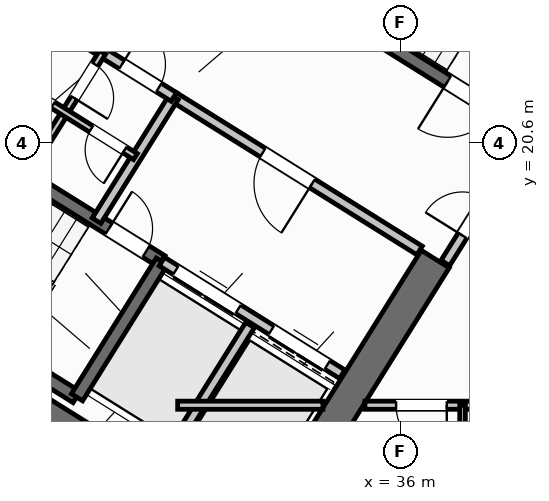
"""IFC4 building model, lengths in metres.
Left out: names, types, materials, properties, quantities, classifications, styles, units other than length and angle.
Written with IfcOpenShell. Run it as: python <this file> out.ifc"""

import sys

from ifc_helpers import new_model, si_unit, direction, frame, frame_2d, origin, place, context, subcontext, project, spatial, rectangle, extrude, source, transform, mapped, element, fill, save


model = new_model("IFC4")
c1 = context("Model", 3, precision=1e-05, world=origin(), true_north=direction((0.0, 1.0)))
c2 = subcontext(c1, "Body", "Model", "MODEL_VIEW")
j1 = project(units=[si_unit("LENGTHUNIT", "METRE"), si_unit("PLANEANGLEUNIT", "RADIAN")], contexts=[c1])
p1 = place(None, origin())
s1 = spatial("IfcSite", under=j1, at=p1, CompositionType="ELEMENT")
p2 = place(p1, origin())
s2 = spatial("IfcBuilding", under=s1, at=p2, CompositionType="ELEMENT")
p3 = place(p2, frame((0.0, 0.0, 45.6)))
s3 = spatial("IfcBuildingStorey", under=s2, at=p3, CompositionType="ELEMENT", Elevation=45.6)
p4 = place(p3, frame((33.409, 12.45, 0.0), z_axis=(0.0, 0.0, 1.0), x_axis=(-0.848051132073, 0.529914405721, 0.0)))
e1 = element("IfcWall", 1, at=p4, inside=s3, PredefinedType="SHEAR", context=c2, shape_type="SweptSolid", body=[
    extrude(rectangle(XDim=13.24, YDim=0.65, at=frame_2d((6.62, 0.0))), origin(), (0.0, 0.0, 1.0), 3.35),
])
p5 = place(p3, frame((36.683, 18.304, 0.0), z_axis=(0.0, 0.0, 1.0), x_axis=(-0.529899109053, -0.848060690178, 0.0)))
e2 = element("IfcWall", 2, at=p5, inside=s3, PredefinedType="SHEAR", context=c2, shape_type="SweptSolid", body=[
    extrude(rectangle(XDim=6.375, YDim=0.65, at=frame_2d((3.188, 0.0))), origin(), (0.0, 0.0, 1.0), 3.35),
])
p6 = place(p3, frame((29.268, 6.429, 0.0), z_axis=(0.0, 0.0, 1.0), x_axis=(-0.848049971435, 0.529916263149, 0.0)))
e3 = element("IfcWall", 3, at=p6, inside=s3, PredefinedType="STANDARD", context=c2, shape_type="SweptSolid", body=[
    extrude(rectangle(XDim=31.588, YDim=0.32, at=frame_2d((15.794, 0.0))), origin(), (0.0, 0.0, 1.0), 3.35),
])
p7 = place(p6, frame((16.362, 0.0, 0.0)))
e4 = element("IfcOpeningElement", 4, at=p7, cuts=e3, PredefinedType="OPENING", context=c2, shape_type="SweptSolid", body=[
    extrude(rectangle(XDim=1.2, YDim=2.15, at=frame_2d((0.6, 1.075))), frame((0.0, 0.17, 0.0), z_axis=(0.0, -1.0, 0.0), x_axis=(1.0, 0.0, 0.0)), (0.0, 0.0, 1.0), 0.34),
])
p8 = place(p6, frame((2.989, 0.0, 0.8)))
e5 = element("IfcOpeningElement", 5, at=p8, cuts=e3, PredefinedType="OPENING", context=c2, shape_type="SweptSolid", body=[
    extrude(rectangle(XDim=2.1, YDim=1.55, at=frame_2d((1.05, 0.775))), frame((0.0, 0.17, 0.0), z_axis=(0.0, -1.0, 0.0), x_axis=(1.0, 0.0, 0.0)), (0.0, 0.0, 1.0), 0.34),
])
p9 = place(p6, frame((8.359, 0.0, 0.8)))
e6 = element("IfcOpeningElement", 6, at=p9, cuts=e3, PredefinedType="OPENING", context=c2, shape_type="SweptSolid", body=[
    extrude(rectangle(XDim=2.1, YDim=1.55, at=frame_2d((1.05, 0.775))), frame((0.0, 0.17, 0.0), z_axis=(0.0, -1.0, 0.0), x_axis=(1.0, 0.0, 0.0)), (0.0, 0.0, 1.0), 0.34),
])
p10 = place(p6, frame((13.284, 0.0, 0.95)))
e7 = element("IfcOpeningElement", 7, at=p10, cuts=e3, PredefinedType="OPENING", context=c2, shape_type="SweptSolid", body=[
    extrude(rectangle(XDim=1.2, YDim=1.4, at=frame_2d((0.6, 0.7))), frame((0.0, 0.17, 0.0), z_axis=(0.0, -1.0, 0.0), x_axis=(1.0, 0.0, 0.0)), (0.0, 0.0, 1.0), 0.34),
])
p11 = place(p6, frame((20.259, 0.0, 0.95)))
e8 = element("IfcOpeningElement", 8, at=p11, cuts=e3, PredefinedType="OPENING", context=c2, shape_type="SweptSolid", body=[
    extrude(rectangle(XDim=1.2, YDim=1.4, at=frame_2d((0.6, 0.7))), frame((0.0, 0.17, 0.0), z_axis=(0.0, -1.0, 0.0), x_axis=(1.0, 0.0, 0.0)), (0.0, 0.0, 1.0), 0.34),
])
p12 = place(p6, frame((22.929, 0.0, 0.95)))
e9 = element("IfcOpeningElement", 9, at=p12, cuts=e3, PredefinedType="OPENING", context=c2, shape_type="SweptSolid", body=[
    extrude(rectangle(XDim=1.2, YDim=1.4, at=frame_2d((0.6, 0.7))), frame((0.0, 0.17, 0.0), z_axis=(0.0, -1.0, 0.0), x_axis=(1.0, 0.0, 0.0)), (0.0, 0.0, 1.0), 0.34),
])
p13 = place(p6, frame((26.106, 0.0, 0.85)))
e10 = element("IfcOpeningElement", 10, at=p13, cuts=e3, PredefinedType="OPENING", context=c2, shape_type="SweptSolid", body=[
    extrude(rectangle(XDim=1.5, YDim=1.5, at=frame_2d((0.75, 0.75))), frame((0.0, 0.17, 0.0), z_axis=(0.0, -1.0, 0.0), x_axis=(1.0, 0.0, 0.0)), (0.0, 0.0, 1.0), 0.34),
])
p14 = place(p6, frame((29.068, 0.0, 0.85)))
e11 = element("IfcOpeningElement", 11, at=p14, cuts=e3, PredefinedType="OPENING", context=c2, shape_type="SweptSolid", body=[
    extrude(rectangle(XDim=1.8, YDim=1.5, at=frame_2d((0.9, 0.75))), frame((0.0, 0.17, 0.0), z_axis=(0.0, -1.0, 0.0), x_axis=(1.0, 0.0, 0.0)), (0.0, 0.0, 1.0), 0.34),
])
p15 = place(p3, frame((29.605, 15.581, 0.0), z_axis=(0.0, 0.0, 1.0), x_axis=(-0.848036911448, 0.529937163087, 0.0)))
e12 = element("IfcWall", 12, at=p15, inside=s3, PredefinedType="SHEAR", context=c2, shape_type="SweptSolid", body=[
    extrude(rectangle(XDim=7.46, YDim=0.26, at=frame_2d((3.73, 0.0))), origin(), (0.0, 0.0, 1.0), 3.35),
])
p16 = place(p3, frame((31.28, 18.261, 0.0), z_axis=(0.0, 0.0, 1.0), x_axis=(-0.848051618787, 0.529913626805, 0.0)))
e13 = element("IfcWall", 13, at=p16, inside=s3, PredefinedType="SHEAR", context=c2, shape_type="SweptSolid", body=[
    extrude(rectangle(XDim=7.46, YDim=0.26, at=frame_2d((3.73, 0.0))), origin(), (0.0, 0.0, 1.0), 3.35),
])
p17 = place(p16, frame((0.36, 0.0, 0.0)))
e14 = element("IfcOpeningElement", 14, at=p17, cuts=e13, PredefinedType="OPENING", context=c2, shape_type="SweptSolid", body=[
    extrude(rectangle(XDim=0.86, YDim=2.05, at=frame_2d((0.43, 1.025))), frame((0.0, 0.14, 0.0), z_axis=(0.0, -1.0, 0.0), x_axis=(1.0, 0.0, 0.0)), (0.0, 0.0, 1.0), 0.28),
])
p18 = place(p3, frame((31.288, 18.256, 0.0), z_axis=(0.0, 0.0, 1.0), x_axis=(-0.529943379326, -0.848033026897, 0.0)))
e15 = element("IfcWall", 15, at=p18, inside=s3, PredefinedType="SHEAR", context=c2, shape_type="SweptSolid", body=[
    extrude(rectangle(XDim=3.16, YDim=0.26, at=frame_2d((1.58, 0.0))), origin(), (0.0, 0.0, 1.0), 3.35),
])
p19 = place(p3, frame((38.046, 21.108, 0.0), z_axis=(0.0, 0.0, 1.0), x_axis=(-0.848054434086, 0.529909121291, 0.0)))
e16 = element("IfcWall", 16, at=p19, inside=s3, PredefinedType="SHEAR", context=c2, shape_type="SweptSolid", body=[
    extrude(rectangle(XDim=7.33, YDim=0.26, at=frame_2d((3.665, 0.0))), origin(), (0.0, 0.0, 1.0), 3.35),
])
p20 = place(p19, frame((0.22, 0.0, 0.0)))
e17 = element("IfcOpeningElement", 17, at=p20, cuts=e16, PredefinedType="OPENING", context=c2, shape_type="SweptSolid", body=[
    extrude(rectangle(XDim=1.1, YDim=2.1, at=frame_2d((0.55, 1.05))), frame((0.0, 0.14, 0.0), z_axis=(0.0, -1.0, 0.0), x_axis=(1.0, 0.0, 0.0)), (0.0, 0.0, 1.0), 0.28),
])
p21 = place(p3, frame((34.848, 16.031, 0.0), z_axis=(0.0, 0.0, 1.0), x_axis=(-0.848044042236, 0.529925751807, 0.0)))
e18 = element("IfcWall", 18, at=p21, inside=s3, PredefinedType="STANDARD", context=c2, shape_type="SweptSolid", body=[
    extrude(rectangle(XDim=4.198, YDim=0.2, at=frame_2d((2.099, 0.0))), origin(), (0.0, 0.0, 1.0), 3.34),
])
p22 = place(p21, frame((0.348, 0.0, 0.0)))
e19 = element("IfcOpeningElement", 19, at=p22, cuts=e18, PredefinedType="OPENING", context=c2, shape_type="SweptSolid", body=[
    extrude(rectangle(XDim=1.3, YDim=2.2, at=frame_2d((0.65, 1.1))), frame((0.0, 0.11, 0.0), z_axis=(0.0, -1.0, 0.0), x_axis=(1.0, 0.0, 0.0)), (0.0, 0.0, 1.0), 0.22),
])
p23 = place(p21, frame((2.423, 0.0, 0.0)))
e20 = element("IfcOpeningElement", 20, at=p23, cuts=e18, PredefinedType="OPENING", context=c2, shape_type="SweptSolid", body=[
    extrude(rectangle(XDim=1.45, YDim=2.25, at=frame_2d((0.725, 1.125))), frame((0.0, 0.11, 0.0), z_axis=(0.0, -1.0, 0.0), x_axis=(1.0, 0.0, 0.0)), (0.0, 0.0, 1.0), 0.22),
])
p24 = place(p3, frame((36.374, 18.474, 0.0), z_axis=(0.0, 0.0, 1.0), x_axis=(-0.848051071577, 0.529914502535, 0.0)))
e21 = element("IfcWall", 21, at=p24, inside=s3, PredefinedType="STANDARD", context=c2, shape_type="SweptSolid", body=[
    extrude(rectangle(XDim=5.718, YDim=0.2, at=frame_2d((2.859, 0.0))), origin(), (0.0, 0.0, 1.0), 3.34),
])
p25 = place(p24, frame((2.498, 0.0, 0.0)))
e22 = element("IfcOpeningElement", 22, at=p25, cuts=e21, PredefinedType="OPENING", context=c2, shape_type="SweptSolid", body=[
    extrude(rectangle(XDim=1.15, YDim=2.1, at=frame_2d((0.575, 1.05))), frame((0.0, 0.11, 0.0), z_axis=(0.0, -1.0, 0.0), x_axis=(1.0, 0.0, 0.0)), (0.0, 0.0, 1.0), 0.22),
])
p26 = place(p3, frame((33.029, 17.003, 0.0), z_axis=(0.0, 0.0, 1.0), x_axis=(-0.529916267533, -0.848049968695, 0.0)))
e23 = element("IfcWall", 23, at=p26, inside=s3, PredefinedType="STANDARD", context=c2, shape_type="SweptSolid", body=[
    extrude(rectangle(XDim=2.92, YDim=0.2, at=frame_2d((1.46, 0.0))), origin(), (0.0, 0.0, 1.0), 3.34),
])
p27 = place(p3, frame((31.525, 21.504, 0.0), z_axis=(0.0, 0.0, 1.0), x_axis=(-0.529907497854, -0.848055448493, 0.0)))
e24 = element("IfcWall", 24, at=p27, inside=s3, PredefinedType="STANDARD", context=c2, shape_type="SweptSolid", body=[
    extrude(rectangle(XDim=2.88, YDim=0.2, at=frame_2d((1.44, 0.0))), origin(), (0.0, 0.0, 1.0), 3.34),
])
p28 = place(p3, frame((31.525, 21.504, 0.0), z_axis=(0.0, 0.0, 1.0), x_axis=(-0.848044998614, 0.529924221305, 0.0)))
e25 = element("IfcWall", 25, at=p28, inside=s3, PredefinedType="STANDARD", context=c2, shape_type="SweptSolid", body=[
    extrude(rectangle(XDim=6.168, YDim=0.2, at=frame_2d((3.084, 0.0))), origin(), (0.0, 0.0, 1.0), 3.34),
])
p29 = place(p28, frame((4.4, 0.0, 0.0)))
e26 = element("IfcOpeningElement", 26, at=p29, cuts=e25, PredefinedType="OPENING", context=c2, shape_type="SweptSolid", body=[
    extrude(rectangle(XDim=0.86, YDim=2.05, at=frame_2d((0.43, 1.025))), frame((0.0, 0.11, 0.0), z_axis=(0.0, -1.0, 0.0), x_axis=(1.0, 0.0, 0.0)), (0.0, 0.0, 1.0), 0.22),
])
p30 = place(p28, frame((0.35, 0.0, 0.0)))
e27 = element("IfcOpeningElement", 27, at=p30, cuts=e25, PredefinedType="OPENING", context=c2, shape_type="SweptSolid", body=[
    extrude(rectangle(XDim=0.86, YDim=2.05, at=frame_2d((0.43, 1.025))), frame((0.0, 0.11, 0.0), z_axis=(0.0, -1.0, 0.0), x_axis=(1.0, 0.0, 0.0)), (0.0, 0.0, 1.0), 0.22),
])
p31 = place(p3, frame((30.117, 22.384, 0.0), z_axis=(0.0, 0.0, 1.0), x_axis=(-0.529951914384, -0.848027693204, 0.0)))
e28 = element("IfcWall", 28, at=p31, inside=s3, PredefinedType="PLUMBINGWALL", context=c2, shape_type="SweptSolid", body=[
    extrude(rectangle(XDim=1.4, YDim=0.14, at=frame_2d((0.7, 0.0))), origin(), (0.0, 0.0, 1.0), 3.34),
])
p32 = place(p31, frame((0.28, 0.0, 0.0)))
e29 = element("IfcOpeningElement", 29, at=p32, cuts=e28, PredefinedType="OPENING", context=c2, shape_type="SweptSolid", body=[
    extrude(rectangle(XDim=0.78, YDim=2.05, at=frame_2d((0.39, 1.025))), frame((0.0, 0.08, 0.0), z_axis=(0.0, -1.0, 0.0), x_axis=(1.0, 0.0, 0.0)), (0.0, 0.0, 1.0), 0.16),
])
p33 = place(p3, frame((29.375, 21.196, 0.0), z_axis=(0.0, 0.0, 1.0), x_axis=(-0.529865479138, -0.848081702443, 0.0)))
e30 = element("IfcWall", 30, at=p33, inside=s3, PredefinedType="PLUMBINGWALL", context=c2, shape_type="SweptSolid", body=[
    extrude(rectangle(XDim=1.48, YDim=0.14, at=frame_2d((0.74, 0.0))), origin(), (0.0, 0.0, 1.0), 3.34),
])
p34 = place(p3, frame((30.766, 20.327, 0.0), z_axis=(0.0, 0.0, 1.0), x_axis=(-0.848052663127, 0.529911955482, 0.0)))
e31 = element("IfcWall", 31, at=p34, inside=s3, PredefinedType="PLUMBINGWALL", context=c2, shape_type="SweptSolid", body=[
    extrude(rectangle(XDim=3.28, YDim=0.14, at=frame_2d((1.64, 0.0))), origin(), (0.0, 0.0, 1.0), 3.34),
])
p35 = place(p34, frame((0.25, 0.0, 0.0)))
e32 = element("IfcOpeningElement", 32, at=p35, cuts=e31, PredefinedType="OPENING", context=c2, shape_type="SweptSolid", body=[
    extrude(rectangle(XDim=0.78, YDim=2.05, at=frame_2d((0.39, 1.025))), frame((0.0, 0.08, 0.0), z_axis=(0.0, -1.0, 0.0), x_axis=(1.0, 0.0, 0.0)), (0.0, 0.0, 1.0), 0.16),
])
p36 = place(p34, frame((1.92, 0.0, 0.0)))
e33 = element("IfcOpeningElement", 33, at=p36, cuts=e31, PredefinedType="OPENING", context=c2, shape_type="SweptSolid", body=[
    extrude(rectangle(XDim=0.78, YDim=2.05, at=frame_2d((0.39, 1.025))), frame((0.0, 0.08, 0.0), z_axis=(0.0, -1.0, 0.0), x_axis=(1.0, 0.0, 0.0)), (0.0, 0.0, 1.0), 0.16),
])
p37 = place(p3, frame((32.164, 10.374, 0.0), z_axis=(0.0, 0.0, 1.0), x_axis=(-0.848044107957, 0.529925646633, 0.0)))
e34 = element("IfcWall", 34, at=p37, inside=s3, PredefinedType="PARTITIONING", context=c2, shape_type="SweptSolid", body=[
    extrude(rectangle(XDim=15.57, YDim=0.16, at=frame_2d((7.785, 0.0))), origin(), (0.0, 0.0, 1.0), 3.34),
])
p38 = place(p37, frame((10.83, 0.0, 0.0)))
e35 = element("IfcOpeningElement", 35, at=p38, cuts=e34, PredefinedType="OPENING", context=c2, shape_type="SweptSolid", body=[
    extrude(rectangle(XDim=1.0, YDim=2.1, at=frame_2d((0.5, 1.05))), frame((0.0, 0.09, 0.0), z_axis=(0.0, -1.0, 0.0), x_axis=(1.0, 0.0, 0.0)), (0.0, 0.0, 1.0), 0.18),
])
p39 = place(p3, frame((29.72, 8.859, 0.0), z_axis=(0.0, 0.0, 1.0), x_axis=(-0.848049134363, 0.529917602752, 0.0)))
e36 = element("IfcWall", 36, at=p39, inside=s3, PredefinedType="PLUMBINGWALL", context=c2, shape_type="SweptSolid", body=[
    extrude(rectangle(XDim=14.3, YDim=0.14, at=frame_2d((7.15, 0.0))), origin(), (0.0, 0.0, 1.0), 3.34),
])
p40 = place(p39, frame((9.57, 0.0, 0.0)))
e37 = element("IfcOpeningElement", 37, at=p40, cuts=e36, PredefinedType="OPENING", context=c2, shape_type="SweptSolid", body=[
    extrude(rectangle(XDim=0.92, YDim=2.08, at=frame_2d((0.46, 1.04))), frame((0.0, 0.08, 0.0), z_axis=(0.0, -1.0, 0.0), x_axis=(1.0, 0.0, 0.0)), (0.0, 0.0, 1.0), 0.16),
])
p41 = place(p3, frame((38.451, 20.737, 0.0), z_axis=(0.0, 0.0, 1.0), x_axis=(-0.529924799939, -0.848044637038, 0.0)))
e38 = element("IfcWall", 38, at=p41, inside=s3, PredefinedType="STANDARD", context=c2, shape_type="SweptSolid", body=[
    extrude(rectangle(XDim=2.96, YDim=0.2, at=frame_2d((1.48, 0.0))), origin(), (0.0, 0.0, 1.0), 3.34),
])
p42 = place(p41, frame((1.46, 0.0, 0.0)))
e39 = element("IfcOpeningElement", 39, at=p42, cuts=e38, PredefinedType="OPENING", context=c2, shape_type="SweptSolid", body=[
    extrude(rectangle(XDim=0.86, YDim=2.05, at=frame_2d((0.43, 1.025))), frame((0.0, 0.11, 0.0), z_axis=(0.0, -1.0, 0.0), x_axis=(1.0, 0.0, 0.0)), (0.0, 0.0, 1.0), 0.22),
])
p43 = place(p3, frame((31.6, 15.42, 0.0), z_axis=(0.0, 0.0, 1.0), x_axis=(1.0, 0.0, 0.0)))
e40 = element("IfcWall", 40, at=p43, inside=s3, PredefinedType="PARTITIONING", context=c2, shape_type="SweptSolid", body=[
    extrude(rectangle(XDim=2.866, YDim=0.16, at=frame_2d((1.433, 0.0))), origin(), (0.0, 0.0, 1.0), 3.34),
])
p44 = place(p3, frame((35.296, 15.42, 0.0), z_axis=(0.0, 0.0, 1.0), x_axis=(1.0, 0.0, 0.0)))
e41 = element("IfcWall", 41, at=p44, inside=s3, PredefinedType="PARTITIONING", context=c2, shape_type="SweptSolid", body=[
    extrude(rectangle(XDim=15.311, YDim=0.16, at=frame_2d((7.655, 0.0))), origin(), (0.0, 0.0, 1.0), 3.34),
])
p45 = place(p44, frame((0.615, 0.0, 0.0)))
e42 = element("IfcOpeningElement", 42, at=p45, cuts=e41, PredefinedType="OPENING", context=c2, shape_type="SweptSolid", body=[
    extrude(rectangle(XDim=1.0, YDim=2.1, at=frame_2d((0.5, 1.05))), frame((0.0, 0.09, 0.0), z_axis=(0.0, -1.0, 0.0), x_axis=(1.0, 0.0, 0.0)), (0.0, 0.0, 1.0), 0.18),
])
p46 = place(p44, frame((9.035, 0.0, 0.0)))
e43 = element("IfcOpeningElement", 43, at=p46, cuts=e41, PredefinedType="OPENING", context=c2, shape_type="SweptSolid", body=[
    extrude(rectangle(XDim=1.0, YDim=2.1, at=frame_2d((0.5, 1.05))), frame((0.0, 0.09, 0.0), z_axis=(0.0, -1.0, 0.0), x_axis=(1.0, 0.0, 0.0)), (0.0, 0.0, 1.0), 0.18),
])
p47 = place(p3, frame((37.222, 1.96, 0.0), z_axis=(0.0, 0.0, 1.0), x_axis=(0.0, 1.0, 0.0)))
e44 = element("IfcWall", 44, at=p47, inside=s3, PredefinedType="PARTITIONING", context=c2, shape_type="SweptSolid", body=[
    extrude(rectangle(XDim=13.46, YDim=0.11, at=frame_2d((6.73, 0.0))), origin(), (0.0, 0.0, 1.0), 3.34),
])
p48 = place(p47, frame((5.2, 0.0, 0.0)))
e45 = element("IfcOpeningElement", 45, at=p48, cuts=e44, PredefinedType="OPENING", context=c2, shape_type="SweptSolid", body=[
    extrude(rectangle(XDim=0.92, YDim=2.08, at=frame_2d((0.46, 1.04))), frame((0.0, 0.065, 0.0), z_axis=(0.0, -1.0, 0.0), x_axis=(1.0, 0.0, 0.0)), (0.0, 0.0, 1.0), 0.13),
])
p49 = place(p47, frame((10.89, 0.0, 0.0)))
e46 = element("IfcOpeningElement", 46, at=p49, cuts=e44, PredefinedType="OPENING", context=c2, shape_type="SweptSolid", body=[
    extrude(rectangle(XDim=0.88, YDim=2.08, at=frame_2d((0.44, 1.04))), frame((0.0, 0.065, 0.0), z_axis=(0.0, -1.0, 0.0), x_axis=(1.0, 0.0, 0.0)), (0.0, 0.0, 1.0), 0.13),
])
m1 = source(origin(), c2, "Body", "SweptSolid", [
    extrude(rectangle(XDim=0.86, YDim=2.05, at=frame_2d((0.43, 1.025))), frame((0.0, 0.025, 0.0), z_axis=(0.0, -1.0, 0.0), x_axis=(1.0, 0.0, 0.0)), (0.0, 0.0, 1.0), 0.05),
])
p50 = place(p17, frame((0.86, 0.0, 0.0), z_axis=(0.0, 0.0, 1.0), x_axis=(-1.0, 0.0, 0.0)))
e47 = element("IfcDoor", 47, at=p50, inside=s3, OperationType="SINGLE_SWING_LEFT", PredefinedType="DOOR", context=c2, shape_type="MappedRepresentation", body=[
    mapped(m1, transform((0.0, 0.0, 0.0), scale=1.0)),
])
fill(e14, e47)
m2 = source(origin(), c2, "Body", "SweptSolid", [
    extrude(rectangle(XDim=1.1, YDim=2.1, at=frame_2d((0.55, 1.05))), frame((0.0, 0.025, 0.0), z_axis=(0.0, -1.0, 0.0), x_axis=(1.0, 0.0, 0.0)), (0.0, 0.0, 1.0), 0.05),
])
p51 = place(p20, origin())
e48 = element("IfcDoor", 48, at=p51, inside=s3, OperationType="SINGLE_SWING_RIGHT", PredefinedType="DOOR", context=c2, shape_type="MappedRepresentation", body=[
    mapped(m2, transform((0.0, 0.0, 0.0), scale=1.0)),
])
fill(e17, e48)
m3 = source(origin(), c2, "Body", "SweptSolid", [
    extrude(rectangle(XDim=1.15, YDim=2.1, at=frame_2d((0.575, 1.05))), frame((0.0, 0.025, 0.0), z_axis=(0.0, -1.0, 0.0), x_axis=(1.0, 0.0, 0.0)), (0.0, 0.0, 1.0), 0.05),
])
p52 = place(p25, origin())
e49 = element("IfcDoor", 49, at=p52, inside=s3, OperationType="SINGLE_SWING_LEFT", PredefinedType="DOOR", context=c2, shape_type="MappedRepresentation", body=[
    mapped(m3, transform((0.0, 0.0, 0.0), scale=1.0)),
])
fill(e22, e49)
m4 = source(origin(), c2, "Body", "SweptSolid", [
    extrude(rectangle(XDim=1.3, YDim=2.2, at=frame_2d((0.65, 1.1))), frame((0.0, 0.025, 0.0), z_axis=(0.0, -1.0, 0.0), x_axis=(1.0, 0.0, 0.0)), (0.0, 0.0, 1.0), 0.05),
])
p53 = place(p22, origin())
e50 = element("IfcDoor", 50, at=p53, inside=s3, OperationType="DOUBLE_DOOR_SLIDING", PredefinedType="DOOR", context=c2, shape_type="MappedRepresentation", body=[
    mapped(m4, transform((0.0, 0.0, 0.0), scale=1.0)),
])
fill(e19, e50)
m5 = source(origin(), c2, "Body", "SweptSolid", [
    extrude(rectangle(XDim=1.45, YDim=2.25, at=frame_2d((0.725, 1.125))), frame((0.0, 0.025, 0.0), z_axis=(0.0, -1.0, 0.0), x_axis=(1.0, 0.0, 0.0)), (0.0, 0.0, 1.0), 0.05),
])
p54 = place(p23, origin())
e51 = element("IfcDoor", 51, at=p54, inside=s3, OperationType="DOUBLE_DOOR_SLIDING", PredefinedType="DOOR", context=c2, shape_type="MappedRepresentation", body=[
    mapped(m5, transform((0.0, 0.0, 0.0), scale=1.0)),
])
fill(e20, e51)
p55 = place(p30, frame((0.86, 0.0, 0.0), z_axis=(0.0, 0.0, 1.0), x_axis=(-1.0, 0.0, 0.0)))
e52 = element("IfcDoor", 52, at=p55, inside=s3, OperationType="SINGLE_SWING_LEFT", PredefinedType="DOOR", context=c2, shape_type="MappedRepresentation", body=[
    mapped(m1, transform((0.0, 0.0, 0.0), scale=1.0)),
])
fill(e27, e52)
m6 = source(origin(), c2, "Body", "SweptSolid", [
    extrude(rectangle(XDim=0.78, YDim=2.05, at=frame_2d((0.39, 1.025))), frame((0.0, 0.025, 0.0), z_axis=(0.0, -1.0, 0.0), x_axis=(1.0, 0.0, 0.0)), (0.0, 0.0, 1.0), 0.05),
])
p56 = place(p32, origin())
e53 = element("IfcDoor", 53, at=p56, inside=s3, OperationType="SINGLE_SWING_RIGHT", PredefinedType="DOOR", context=c2, shape_type="MappedRepresentation", body=[
    mapped(m6, transform((0.0, 0.0, 0.0), scale=1.0)),
])
fill(e29, e53)
p57 = place(p35, origin())
e54 = element("IfcDoor", 54, at=p57, inside=s3, OperationType="SINGLE_SWING_LEFT", PredefinedType="DOOR", context=c2, shape_type="MappedRepresentation", body=[
    mapped(m6, transform((0.0, 0.0, 0.0), scale=1.0)),
])
fill(e32, e54)
p58 = place(p36, origin())
e55 = element("IfcDoor", 55, at=p58, inside=s3, OperationType="SINGLE_SWING_RIGHT", PredefinedType="DOOR", context=c2, shape_type="MappedRepresentation", body=[
    mapped(m6, transform((0.0, 0.0, 0.0), scale=1.0)),
])
fill(e33, e55)
p59 = place(p42, frame((0.86, 0.0, 0.0), z_axis=(0.0, 0.0, 1.0), x_axis=(-1.0, 0.0, 0.0)))
e56 = element("IfcDoor", 56, at=p59, inside=s3, OperationType="SINGLE_SWING_LEFT", PredefinedType="DOOR", context=c2, shape_type="MappedRepresentation", body=[
    mapped(m1, transform((0.0, 0.0, 0.0), scale=1.0)),
])
fill(e39, e56)
m7 = source(origin(), c2, "Body", "SweptSolid", [
    extrude(rectangle(XDim=1.0, YDim=2.1, at=frame_2d((0.5, 1.05))), frame((0.0, 0.025, 0.0), z_axis=(0.0, -1.0, 0.0), x_axis=(1.0, 0.0, 0.0)), (0.0, 0.0, 1.0), 0.05),
])
p60 = place(p45, frame((1.0, 0.0, 0.0), z_axis=(0.0, 0.0, 1.0), x_axis=(-1.0, 0.0, 0.0)))
e57 = element("IfcDoor", 57, at=p60, inside=s3, OperationType="SINGLE_SWING_LEFT", PredefinedType="DOOR", context=c2, shape_type="MappedRepresentation", body=[
    mapped(m7, transform((0.0, 0.0, 0.0), scale=1.0)),
])
fill(e42, e57)
save(model, sys.argv[1])
